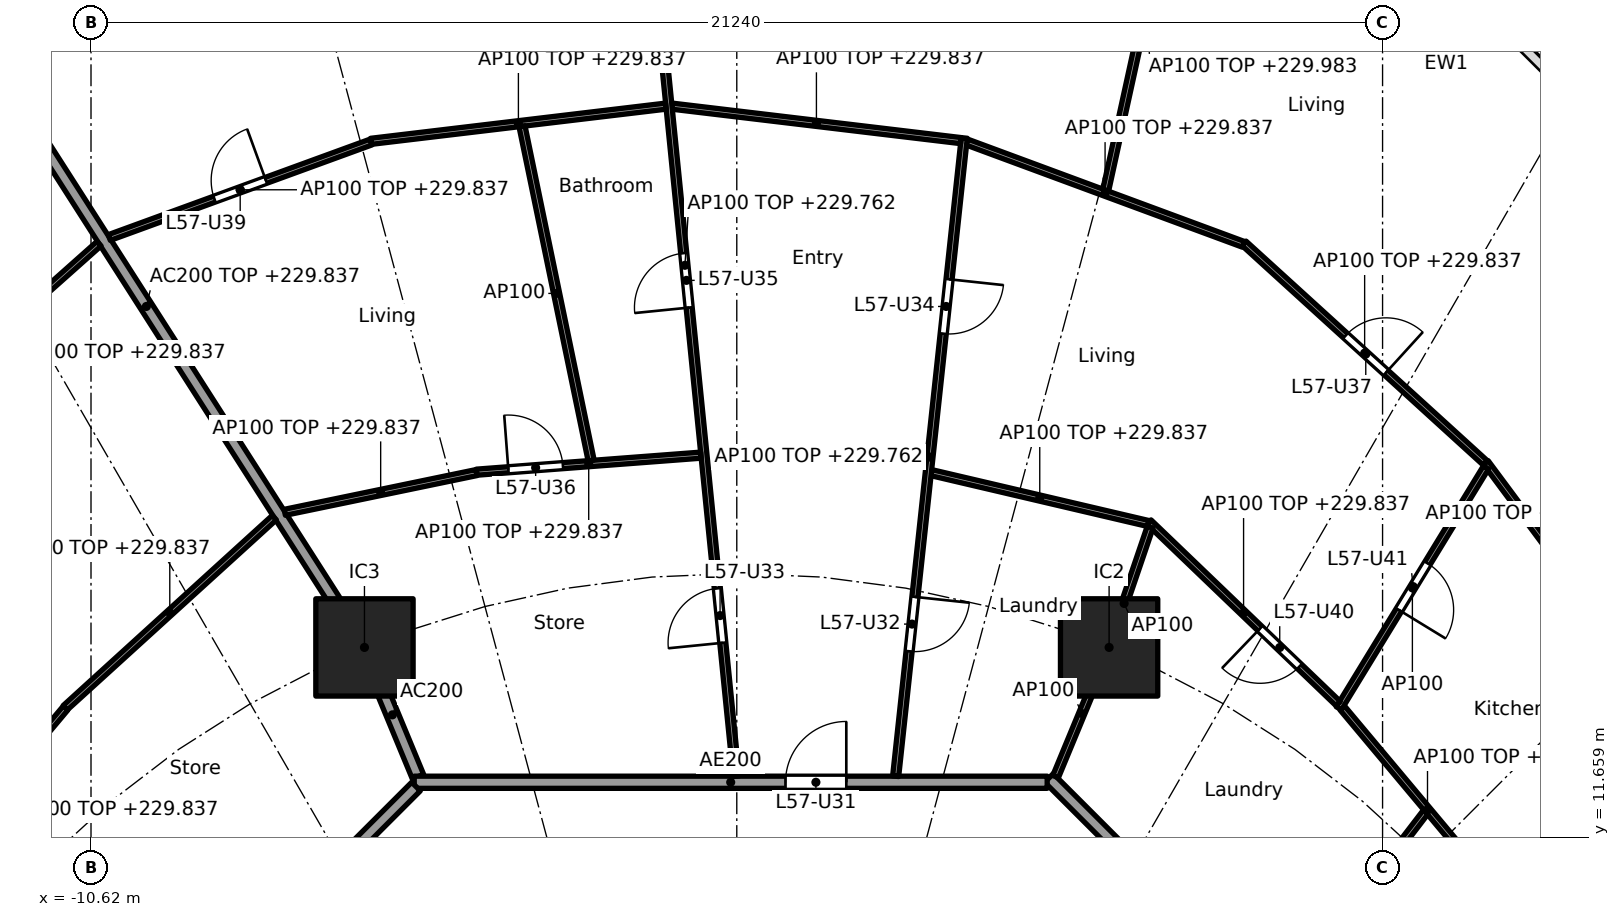
"""IFC4 building model, lengths in metres.
Left out: names, types, materials, properties, quantities, classifications, styles, units other than length and angle.
Written with IfcOpenShell. Run it as: python <this file> out.ifc"""

import sys

from ifc_helpers import new_model, si_unit, direction, frame, frame_2d, origin, origin_2d, place, context, subcontext, project, spatial, rectangle, extrude, element, fill, save


model = new_model("IFC4")
c1 = context("Model", 3, precision=1e-05, world=origin(), true_north=direction((0.0, 1.0)))
c2 = subcontext(c1, "Body", "Model", "MODEL_VIEW")
j1 = project(units=[si_unit("LENGTHUNIT", "METRE"), si_unit("PLANEANGLEUNIT", "RADIAN")], contexts=[c1])
p1 = place(None, origin())
s1 = spatial("IfcSite", under=j1, at=p1, CompositionType="ELEMENT")
p2 = place(p1, origin())
s2 = spatial("IfcBuilding", under=s1, at=p2, CompositionType="ELEMENT")
p3 = place(p2, frame((0.0, 0.0, 227.0)))
s3 = spatial("IfcBuildingStorey", under=s2, at=p3, CompositionType="ELEMENT", Elevation=227.0)
for number, where, z_axis, x_axis in (
    (1, (6.123, 14.782, 0.0), (0.0, 0.0, 1.0), (1.0, 0.0, 0.0)),
    (2, (-6.123, 14.782, 0.0), (0.0, 0.0, 1.0), (1.0, 0.0, 0.0)),
):
    element("IfcColumn", number, at=place(p3, frame(where, z_axis=z_axis, x_axis=x_axis)), inside=s3, PredefinedType="COLUMN", context=c2, shape_type="SweptSolid", body=[
        extrude(rectangle(XDim=1.6, YDim=1.6, at=origin_2d()), origin(), (0.0, 0.0, 1.0), 3.7),
    ])
p4 = place(p3, frame((-5.243, 12.657, 0.0), z_axis=(0.0, 0.0, 1.0), x_axis=(-0.382691608661, 0.923876145736, 0.0)))
e3 = element("IfcWall", 3, at=p4, inside=s3, PredefinedType="PARTITIONING", context=c2, shape_type="SweptSolid", body=[
    extrude(rectangle(XDim=2.2, YDim=0.2, at=frame_2d((1.1, 0.0))), origin(), (0.0, 0.0, 1.0), 3.44),
])
p5 = place(p3, frame((-6.15, 14.824, 0.0), z_axis=(0.0, 0.0, 1.0), x_axis=(-0.538870687577, 0.842388498301, 0.0)))
e4 = element("IfcWall", 4, at=p5, inside=s3, PredefinedType="PARTITIONING", context=c2, shape_type="SweptSolid", body=[
    extrude(rectangle(XDim=13.213, YDim=0.2, at=frame_2d((6.606, 0.0))), origin(), (0.0, 0.0, 1.0), 2.837),
])
p6 = place(p3, frame((12.635, 5.134, 0.0), z_axis=(0.0, 0.0, 1.0), x_axis=(-0.707106781187, 0.707106781187, 0.0)))
e5 = element("IfcWall", 5, at=p6, inside=s3, PredefinedType="PARTITIONING", context=c2, shape_type="SweptSolid", body=[
    extrude(rectangle(XDim=10.609, YDim=0.2, at=frame_2d((5.305, 0.0))), origin(), (0.0, 0.0, 1.0), 3.44),
])
p7 = place(p3, frame((5.104, 12.565, 0.0), z_axis=(0.0, 0.0, 1.0), x_axis=(-1.0, 0.0, 0.0)))
e6 = element("IfcWall", 6, at=p7, inside=s3, PredefinedType="PARTITIONING", context=c2, shape_type="SweptSolid", body=[
    extrude(rectangle(XDim=10.409, YDim=0.2, at=frame_2d((5.205, 0.0))), origin(), (0.0, 0.0, 1.0), 3.44),
])
p8 = place(p7, frame((3.303, 0.0, 0.0)))
e7 = element("IfcOpeningElement", 7, at=p8, cuts=e6, PredefinedType="OPENING", context=c2, shape_type="SweptSolid", body=[
    extrude(rectangle(XDim=1.0, YDim=2.1, at=frame_2d((0.5, 1.05))), frame((0.0, 0.11, 0.0), z_axis=(0.0, -1.0, 0.0), x_axis=(1.0, 0.0, 0.0)), (0.0, 0.0, 1.0), 0.22),
])
p9 = place(p3, frame((-5.275, 12.494, 0.0), z_axis=(0.0, 0.0, 1.0), x_axis=(-0.707106781187, -0.707106781187, 0.0)))
e8 = element("IfcWall", 8, at=p9, inside=s3, PredefinedType="PARTITIONING", context=c2, shape_type="SweptSolid", body=[
    extrude(rectangle(XDim=10.209, YDim=0.2, at=frame_2d((5.104, 0.0))), origin(), (0.0, 0.0, 1.0), 3.44),
])
p10 = place(p9, frame((6.339, 0.0, 0.0)))
e9 = element("IfcOpeningElement", 9, at=p10, cuts=e8, PredefinedType="OPENING", context=c2, shape_type="SweptSolid", body=[
    extrude(rectangle(XDim=1.0, YDim=2.1, at=frame_2d((0.5, 1.05))), frame((0.0, 0.11, 0.0), z_axis=(0.0, -1.0, 0.0), x_axis=(1.0, 0.0, 0.0)), (0.0, 0.0, 1.0), 0.22),
])
p11 = place(p3, frame((12.759, 10.443, 0.0), z_axis=(0.0, 0.0, 1.0), x_axis=(-0.642225196965, 0.766516011825, 0.0)))
e10 = element("IfcWall", 10, at=p11, inside=s3, PredefinedType="PARTITIONING", context=c2, shape_type="SweptSolid", body=[
    extrude(rectangle(XDim=4.361, YDim=0.1, at=frame_2d((2.18, 0.0))), origin(), (0.0, 0.0, 1.0), 2.837),
])
p12 = place(p3, frame((15.621, 13.374, 0.0), z_axis=(0.0, 0.0, 1.0), x_axis=(-0.596165830899, 0.802861321816, 0.0)))
e11 = element("IfcWall", 11, at=p12, inside=s3, PredefinedType="PARTITIONING", context=c2, shape_type="SweptSolid", body=[
    extrude(rectangle(XDim=5.542, YDim=0.1, at=frame_2d((2.771, 0.0))), origin(), (0.0, 0.0, 1.0), 2.837),
])
p13 = place(p3, frame((8.946, 8.964, 0.0), z_axis=(0.0, 0.0, 1.0), x_axis=(0.608213063121, 0.793773815296, 0.0)))
e12 = element("IfcWall", 12, at=p13, inside=s3, PredefinedType="PARTITIONING", context=c2, shape_type="SweptSolid", body=[
    extrude(rectangle(XDim=3.918, YDim=0.1, at=frame_2d((1.959, 0.0))), origin(), (0.0, 0.0, 1.0), 2.762),
])
p14 = place(p3, frame((9.9, 13.781, 0.0), z_axis=(0.0, 0.0, 1.0), x_axis=(0.521464905534, 0.853272730313, 0.0)))
e13 = element("IfcWall", 13, at=p14, inside=s3, PredefinedType="PARTITIONING", context=c2, shape_type="SweptSolid", body=[
    extrude(rectangle(XDim=4.641, YDim=0.1, at=frame_2d((2.32, 0.0))), origin(), (0.0, 0.0, 1.0), 3.44),
])
p15 = place(p14, frame((1.895, 0.0, 0.0)))
e14 = element("IfcOpeningElement", 14, at=p15, cuts=e13, PredefinedType="OPENING", context=c2, shape_type="SweptSolid", body=[
    extrude(rectangle(XDim=0.9, YDim=2.1, at=frame_2d((0.45, 1.05))), frame((0.0, 0.06, 0.0), z_axis=(0.0, -1.0, 0.0), x_axis=(1.0, 0.0, 0.0)), (0.0, 0.0, 1.0), 0.12),
])
p16 = place(p3, frame((9.89, 13.858, 0.0), z_axis=(0.0, 0.0, 1.0), x_axis=(-0.72167233993, 0.692234811159, 0.0)))
e15 = element("IfcWall", 15, at=p16, inside=s3, PredefinedType="PARTITIONING", context=c2, shape_type="SweptSolid", body=[
    extrude(rectangle(XDim=4.313, YDim=0.1, at=frame_2d((2.156, 0.0))), origin(), (0.0, 0.0, 1.0), 2.837),
])
p17 = place(p16, frame((0.883, 0.0, 0.0)))
e16 = element("IfcOpeningElement", 16, at=p17, cuts=e15, PredefinedType="OPENING", context=c2, shape_type="SweptSolid", body=[
    extrude(rectangle(XDim=0.9, YDim=2.1, at=frame_2d((0.45, 1.05))), frame((0.0, 0.06, 0.0), z_axis=(0.0, -1.0, 0.0), x_axis=(1.0, 0.0, 0.0)), (0.0, 0.0, 1.0), 0.12),
])
p18 = place(p3, frame((12.31, 17.817, 0.0), z_axis=(0.0, 0.0, 1.0), x_axis=(-0.739697052892, 0.672940019573, 0.0)))
e17 = element("IfcWall", 17, at=p18, inside=s3, PredefinedType="PARTITIONING", context=c2, shape_type="SweptSolid", body=[
    extrude(rectangle(XDim=5.365, YDim=0.1, at=frame_2d((2.683, 0.0))), origin(), (0.0, 0.0, 1.0), 2.837),
])
p19 = place(p18, frame((2.208, 0.0, 0.0)))
e18 = element("IfcOpeningElement", 18, at=p19, cuts=e17, PredefinedType="OPENING", context=c2, shape_type="SweptSolid", body=[
    extrude(rectangle(XDim=0.9, YDim=2.1, at=frame_2d((0.45, 1.05))), frame((0.0, 0.06, 0.0), z_axis=(0.0, -1.0, 0.0), x_axis=(1.0, 0.0, 0.0)), (0.0, 0.0, 1.0), 0.12),
])
p20 = place(p3, frame((5.243, 12.657, 0.0), z_axis=(0.0, 0.0, 1.0), x_axis=(0.382719158442, 0.923864733477, 0.0)))
e19 = element("IfcWall", 19, at=p20, inside=s3, PredefinedType="PARTITIONING", context=c2, shape_type="SweptSolid", body=[
    extrude(rectangle(XDim=2.25, YDim=0.1, at=frame_2d((1.125, 0.0))), origin(), (0.0, 0.0, 1.0), 3.44),
])
p21 = place(p3, frame((6.139, 14.829, 0.0), z_axis=(0.0, 0.0, 1.0), x_axis=(0.32278593828, 0.946471995385, 0.0)))
e20 = element("IfcWall", 20, at=p21, inside=s3, PredefinedType="PARTITIONING", context=c2, shape_type="SweptSolid", body=[
    extrude(rectangle(XDim=2.042, YDim=0.1, at=frame_2d((1.021, 0.0))), origin(), (0.0, 0.0, 1.0), 3.44),
])
p22 = place(p3, frame((6.766, 16.82, 0.0), z_axis=(0.0, 0.0, 1.0), x_axis=(-0.973612608559, 0.22820711745, 0.0)))
e21 = element("IfcWall", 21, at=p22, inside=s3, PredefinedType="PARTITIONING", context=c2, shape_type="SweptSolid", body=[
    extrude(rectangle(XDim=3.663, YDim=0.1, at=frame_2d((1.832, 0.0))), origin(), (0.0, 0.0, 1.0), 2.837),
])
p23 = place(p3, frame((8.331, 21.411, 0.0), z_axis=(0.0, 0.0, 1.0), x_axis=(-0.937891982431, 0.346927412136, 0.0)))
e22 = element("IfcWall", 22, at=p23, inside=s3, PredefinedType="PARTITIONING", context=c2, shape_type="SweptSolid", body=[
    extrude(rectangle(XDim=4.85, YDim=0.1, at=frame_2d((2.425, 0.0))), origin(), (0.0, 0.0, 1.0), 2.837),
])
p24 = place(p3, frame((6.067, 22.301, 0.0), z_axis=(0.0, 0.0, 1.0), x_axis=(0.214401821533, 0.976745544614, 0.0)))
e23 = element("IfcWall", 23, at=p24, inside=s3, PredefinedType="PARTITIONING", context=c2, shape_type="SweptSolid", body=[
    extrude(rectangle(XDim=6.228, YDim=0.1, at=frame_2d((3.114, 0.0))), origin(), (0.0, 0.0, 1.0), 2.983),
])
p25 = place(p24, frame((2.664, 0.0, 0.0)))
e24 = element("IfcOpeningElement", 24, at=p25, cuts=e23, PredefinedType="OPENING", context=c2, shape_type="SweptSolid", body=[
    extrude(rectangle(XDim=0.9, YDim=2.1, at=frame_2d((0.45, 1.05))), frame((0.0, 0.06, 0.0), z_axis=(0.0, -1.0, 0.0), x_axis=(1.0, 0.0, 0.0)), (0.0, 0.0, 1.0), 0.12),
])
p26 = place(p3, frame((2.613, 12.664, 0.0), z_axis=(0.0, 0.0, 1.0), x_axis=(0.106823825758, 0.994277964279, 0.0)))
e25 = element("IfcWall", 25, at=p26, inside=s3, PredefinedType="PARTITIONING", context=c2, shape_type="SweptSolid", body=[
    extrude(rectangle(XDim=10.556, YDim=0.1, at=frame_2d((5.278, 0.0))), origin(), (0.0, 0.0, 1.0), 2.762),
])
p27 = place(p26, frame((2.066, 0.0, 0.0)))
e26 = element("IfcOpeningElement", 26, at=p27, cuts=e25, PredefinedType="OPENING", context=c2, shape_type="SweptSolid", body=[
    extrude(rectangle(XDim=0.9, YDim=2.1, at=frame_2d((0.45, 1.05))), frame((0.0, 0.06, 0.0), z_axis=(0.0, -1.0, 0.0), x_axis=(1.0, 0.0, 0.0)), (0.0, 0.0, 1.0), 0.12),
])
p28 = place(p26, frame((7.32, 0.0, 0.0)))
e27 = element("IfcOpeningElement", 27, at=p28, cuts=e25, PredefinedType="OPENING", context=c2, shape_type="SweptSolid", body=[
    extrude(rectangle(XDim=0.9, YDim=2.1, at=frame_2d((0.45, 1.05))), frame((0.0, 0.06, 0.0), z_axis=(0.0, -1.0, 0.0), x_axis=(1.0, 0.0, 0.0)), (0.0, 0.0, 1.0), 0.12),
])
p29 = place(p3, frame((3.686, 23.117, 0.0), z_axis=(0.0, 0.0, 1.0), x_axis=(-0.992965872314, 0.11840091393, 0.0)))
e28 = element("IfcWall", 28, at=p29, inside=s3, PredefinedType="PARTITIONING", context=c2, shape_type="SweptSolid", body=[
    extrude(rectangle(XDim=4.786, YDim=0.1, at=frame_2d((2.393, 0.0))), origin(), (0.0, 0.0, 1.0), 2.837),
])
p30 = place(p3, frame((-0.01, 12.664, 0.0), z_axis=(0.0, 0.0, 1.0), x_axis=(-0.099808591851, 0.995006655753, 0.0)))
e29 = element("IfcWall", 29, at=p30, inside=s3, PredefinedType="PARTITIONING", context=c2, shape_type="SweptSolid", body=[
    extrude(rectangle(XDim=16.888, YDim=0.1, at=frame_2d((8.444, 0.0))), origin(), (0.0, 0.0, 1.0), 2.762),
])
p31 = place(p30, frame((2.205, 0.0, 0.0)))
e30 = element("IfcOpeningElement", 30, at=p31, cuts=e29, PredefinedType="OPENING", context=c2, shape_type="SweptSolid", body=[
    extrude(rectangle(XDim=0.9, YDim=2.1, at=frame_2d((0.45, 1.05))), frame((0.0, 0.06, 0.0), z_axis=(0.0, -1.0, 0.0), x_axis=(1.0, 0.0, 0.0)), (0.0, 0.0, 1.0), 0.12),
])
p32 = place(p30, frame((7.745, 0.0, 0.0)))
e31 = element("IfcOpeningElement", 31, at=p32, cuts=e29, PredefinedType="OPENING", context=c2, shape_type="SweptSolid", body=[
    extrude(rectangle(XDim=0.9, YDim=2.1, at=frame_2d((0.45, 1.05))), frame((0.0, 0.06, 0.0), z_axis=(0.0, -1.0, 0.0), x_axis=(1.0, 0.0, 0.0)), (0.0, 0.0, 1.0), 0.12),
])
p33 = place(p3, frame((-0.59, 17.944, 0.0), z_axis=(0.0, 0.0, 1.0), x_axis=(-0.997133495787, -0.075662352452, 0.0)))
e32 = element("IfcWall", 32, at=p33, inside=s3, PredefinedType="PARTITIONING", context=c2, shape_type="SweptSolid", body=[
    extrude(rectangle(XDim=3.701, YDim=0.1, at=frame_2d((1.851, 0.0))), origin(), (0.0, 0.0, 1.0), 2.837),
])
p34 = place(p33, frame((2.276, 0.0, 0.0)))
e33 = element("IfcOpeningElement", 33, at=p34, cuts=e32, PredefinedType="OPENING", context=c2, shape_type="SweptSolid", body=[
    extrude(rectangle(XDim=0.9, YDim=2.1, at=frame_2d((0.45, 1.05))), frame((0.0, 0.06, 0.0), z_axis=(0.0, -1.0, 0.0), x_axis=(1.0, 0.0, 0.0)), (0.0, 0.0, 1.0), 0.12),
])
p35 = place(p3, frame((-1.166, 23.683, 0.0), z_axis=(0.0, 0.0, 1.0), x_axis=(-0.992961712415, -0.118435795593, 0.0)))
e34 = element("IfcWall", 34, at=p35, inside=s3, PredefinedType="PARTITIONING", context=c2, shape_type="SweptSolid", body=[
    extrude(rectangle(XDim=4.885, YDim=0.1, at=frame_2d((2.443, 0.0))), origin(), (0.0, 0.0, 1.0), 2.837),
])
p36 = place(p3, frame((-2.395, 17.857, 0.0), z_axis=(0.0, 0.0, 1.0), x_axis=(-0.20251351451, 0.979279467997, 0.0)))
e35 = element("IfcWall", 35, at=p36, inside=s3, PredefinedType="PARTITIONING", context=c2, shape_type="SweptSolid", body=[
    extrude(rectangle(XDim=5.611, YDim=0.1, at=frame_2d((2.805, 0.0))), origin(), (0.0, 0.0, 1.0), 3.44),
])
p37 = place(p3, frame((-4.28, 17.657, 0.0), z_axis=(0.0, 0.0, 1.0), x_axis=(-0.979195545385, -0.202918909661, 0.0)))
e36 = element("IfcWall", 36, at=p37, inside=s3, PredefinedType="PARTITIONING", context=c2, shape_type="SweptSolid", body=[
    extrude(rectangle(XDim=3.221, YDim=0.1, at=frame_2d((1.61, 0.0))), origin(), (0.0, 0.0, 1.0), 2.837),
])
p38 = place(p3, frame((-6.014, 23.094, 0.0), z_axis=(0.0, 0.0, 1.0), x_axis=(-0.939433575811, -0.342731026665, 0.0)))
e37 = element("IfcWall", 37, at=p38, inside=s3, PredefinedType="PARTITIONING", context=c2, shape_type="SweptSolid", body=[
    extrude(rectangle(XDim=4.583, YDim=0.1, at=frame_2d((2.291, 0.0))), origin(), (0.0, 0.0, 1.0), 2.837),
])
p39 = place(p38, frame((1.841, 0.0, 0.0)))
e38 = element("IfcOpeningElement", 38, at=p39, cuts=e37, PredefinedType="OPENING", context=c2, shape_type="SweptSolid", body=[
    extrude(rectangle(XDim=0.9, YDim=2.1, at=frame_2d((0.45, 1.05))), frame((0.0, 0.06, 0.0), z_axis=(0.0, -1.0, 0.0), x_axis=(1.0, 0.0, 0.0)), (0.0, 0.0, 1.0), 0.12),
])
p40 = place(p3, frame((-7.605, 16.917, 0.0), z_axis=(0.0, 0.0, 1.0), x_axis=(-0.739828340504, -0.672795679673, 0.0)))
e39 = element("IfcWall", 39, at=p40, inside=s3, PredefinedType="PARTITIONING", context=c2, shape_type="SweptSolid", body=[
    extrude(rectangle(XDim=4.647, YDim=0.1, at=frame_2d((2.324, 0.0))), origin(), (0.0, 0.0, 1.0), 2.837),
])
p41 = place(p3, frame((-10.488, 21.422, 0.0), z_axis=(0.0, 0.0, 1.0), x_axis=(-0.747148551049, -0.664657086523, 0.0)))
e40 = element("IfcWall", 40, at=p41, inside=s3, PredefinedType="PARTITIONING", context=c2, shape_type="SweptSolid", body=[
    extrude(rectangle(XDim=5.425, YDim=0.1, at=frame_2d((2.712, 0.0))), origin(), (0.0, 0.0, 1.0), 2.837),
])
p42 = place(p41, frame((2.262, 0.0, 0.0)))
e41 = element("IfcOpeningElement", 41, at=p42, cuts=e40, PredefinedType="OPENING", context=c2, shape_type="SweptSolid", body=[
    extrude(rectangle(XDim=0.9, YDim=2.1, at=frame_2d((0.45, 1.05))), frame((0.0, 0.06, 0.0), z_axis=(0.0, -1.0, 0.0), x_axis=(1.0, 0.0, 0.0)), (0.0, 0.0, 1.0), 0.12),
])
p43 = place(p3, frame((-11.039, 13.785, 0.0), z_axis=(0.0, 0.0, 1.0), x_axis=(-0.642323585424, -0.766433566337, 0.0)))
e42 = element("IfcWall", 42, at=p43, inside=s3, PredefinedType="PARTITIONING", context=c2, shape_type="SweptSolid", body=[
    extrude(rectangle(XDim=2.13, YDim=0.1, at=frame_2d((1.065, 0.0))), origin(), (0.0, 0.0, 1.0), 2.837),
])
p44 = place(p3, frame((-8.959, 8.952, 0.0), z_axis=(0.0, 0.0, 1.0), x_axis=(-0.740140081805, 0.672452719011, 0.0)))
e43 = element("IfcWall", 43, at=p44, inside=s3, PredefinedType="PARTITIONING", context=c2, shape_type="SweptSolid", body=[
    extrude(rectangle(XDim=9.775, YDim=0.1, at=frame_2d((4.887, 0.0))), origin(), (0.0, 0.0, 1.0), 2.762),
])
p45 = place(p44, frame((1.901, 0.0, 0.0)))
e44 = element("IfcOpeningElement", 44, at=p45, cuts=e43, PredefinedType="OPENING", context=c2, shape_type="SweptSolid", body=[
    extrude(rectangle(XDim=0.9, YDim=2.1, at=frame_2d((0.45, 1.05))), frame((0.0, 0.06, 0.0), z_axis=(0.0, -1.0, 0.0), x_axis=(1.0, 0.0, 0.0)), (0.0, 0.0, 1.0), 0.12),
])
p46 = place(p44, frame((6.789, 0.0, 0.0)))
e45 = element("IfcOpeningElement", 45, at=p46, cuts=e43, PredefinedType="OPENING", context=c2, shape_type="SweptSolid", body=[
    extrude(rectangle(XDim=0.9, YDim=2.1, at=frame_2d((0.45, 1.05))), frame((0.0, 0.06, 0.0), z_axis=(0.0, -1.0, 0.0), x_axis=(1.0, 0.0, 0.0)), (0.0, 0.0, 1.0), 0.12),
])
p47 = place(p8, frame((1.0, 0.0, 0.0), x_axis=(-1.0, 0.0, 0.0)))
e46 = element("IfcDoor", 46, at=p47, inside=s3, OperationType="SINGLE_SWING_RIGHT", PredefinedType="DOOR", context=c2, shape_type="SweptSolid", body=[
    extrude(rectangle(XDim=1.0, YDim=2.1, at=frame_2d((0.5, 1.05))), frame((0.0, 0.025, 0.0), z_axis=(0.0, -1.0, 0.0), x_axis=(1.0, 0.0, 0.0)), (0.0, 0.0, 1.0), 0.05),
])
fill(e7, e46)
p48 = place(p27, frame((0.9, 0.0, 0.0), x_axis=(-1.0, 0.0, 0.0)))
e47 = element("IfcDoor", 47, at=p48, inside=s3, OperationType="SINGLE_SWING_LEFT", PredefinedType="DOOR", context=c2, shape_type="SweptSolid", body=[
    extrude(rectangle(XDim=0.9, YDim=2.1, at=frame_2d((0.45, 1.05))), frame((0.0, 0.025, 0.0), z_axis=(0.0, -1.0, 0.0), x_axis=(1.0, 0.0, 0.0)), (0.0, 0.0, 1.0), 0.05),
])
fill(e26, e47)
p49 = place(p31, origin())
e48 = element("IfcDoor", 48, at=p49, inside=s3, OperationType="SINGLE_SWING_LEFT", PredefinedType="DOOR", context=c2, shape_type="SweptSolid", body=[
    extrude(rectangle(XDim=0.9, YDim=2.1, at=frame_2d((0.45, 1.05))), frame((0.0, 0.025, 0.0), z_axis=(0.0, -1.0, 0.0), x_axis=(1.0, 0.0, 0.0)), (0.0, 0.0, 1.0), 0.05),
])
fill(e30, e48)
p50 = place(p28, frame((0.9, 0.0, 0.0), x_axis=(-1.0, 0.0, 0.0)))
e49 = element("IfcDoor", 49, at=p50, inside=s3, OperationType="SINGLE_SWING_LEFT", PredefinedType="DOOR", context=c2, shape_type="SweptSolid", body=[
    extrude(rectangle(XDim=0.9, YDim=2.1, at=frame_2d((0.45, 1.05))), frame((0.0, 0.025, 0.0), z_axis=(0.0, -1.0, 0.0), x_axis=(1.0, 0.0, 0.0)), (0.0, 0.0, 1.0), 0.05),
])
fill(e27, e49)
p51 = place(p32, origin())
e50 = element("IfcDoor", 50, at=p51, inside=s3, OperationType="SINGLE_SWING_LEFT", PredefinedType="DOOR", context=c2, shape_type="SweptSolid", body=[
    extrude(rectangle(XDim=0.9, YDim=2.1, at=frame_2d((0.45, 1.05))), frame((0.0, 0.025, 0.0), z_axis=(0.0, -1.0, 0.0), x_axis=(1.0, 0.0, 0.0)), (0.0, 0.0, 1.0), 0.05),
])
fill(e31, e50)
p52 = place(p34, frame((0.9, 0.0, 0.0), x_axis=(-1.0, 0.0, 0.0)))
e51 = element("IfcDoor", 51, at=p52, inside=s3, OperationType="SINGLE_SWING_LEFT", PredefinedType="DOOR", context=c2, shape_type="SweptSolid", body=[
    extrude(rectangle(XDim=0.9, YDim=2.1, at=frame_2d((0.45, 1.05))), frame((0.0, 0.025, 0.0), z_axis=(0.0, -1.0, 0.0), x_axis=(1.0, 0.0, 0.0)), (0.0, 0.0, 1.0), 0.05),
])
fill(e33, e51)
p53 = place(p19, frame((0.9, 0.0, 0.0), x_axis=(-1.0, 0.0, 0.0)))
e52 = element("IfcDoor", 52, at=p53, inside=s3, OperationType="SINGLE_SWING_RIGHT", PredefinedType="DOOR", context=c2, shape_type="SweptSolid", body=[
    extrude(rectangle(XDim=0.9, YDim=2.1, at=frame_2d((0.45, 1.05))), frame((0.0, 0.025, 0.0), z_axis=(0.0, -1.0, 0.0), x_axis=(1.0, 0.0, 0.0)), (0.0, 0.0, 1.0), 0.05),
])
fill(e18, e52)
p54 = place(p39, frame((0.9, 0.0, 0.0), x_axis=(-1.0, 0.0, 0.0)))
e53 = element("IfcDoor", 53, at=p54, inside=s3, OperationType="SINGLE_SWING_RIGHT", PredefinedType="DOOR", context=c2, shape_type="SweptSolid", body=[
    extrude(rectangle(XDim=0.9, YDim=2.1, at=frame_2d((0.45, 1.05))), frame((0.0, 0.025, 0.0), z_axis=(0.0, -1.0, 0.0), x_axis=(1.0, 0.0, 0.0)), (0.0, 0.0, 1.0), 0.05),
])
fill(e38, e53)
p55 = place(p17, origin())
e54 = element("IfcDoor", 54, at=p55, inside=s3, OperationType="SINGLE_SWING_RIGHT", PredefinedType="DOOR", context=c2, shape_type="SweptSolid", body=[
    extrude(rectangle(XDim=0.9, YDim=2.1, at=frame_2d((0.45, 1.05))), frame((0.0, 0.025, 0.0), z_axis=(0.0, -1.0, 0.0), x_axis=(1.0, 0.0, 0.0)), (0.0, 0.0, 1.0), 0.05),
])
fill(e16, e54)
p56 = place(p15, frame((0.9, 0.0, 0.0), x_axis=(-1.0, 0.0, 0.0)))
e55 = element("IfcDoor", 55, at=p56, inside=s3, OperationType="SINGLE_SWING_RIGHT", PredefinedType="DOOR", context=c2, shape_type="SweptSolid", body=[
    extrude(rectangle(XDim=0.9, YDim=2.1, at=frame_2d((0.45, 1.05))), frame((0.0, 0.025, 0.0), z_axis=(0.0, -1.0, 0.0), x_axis=(1.0, 0.0, 0.0)), (0.0, 0.0, 1.0), 0.05),
])
fill(e14, e55)
save(model, sys.argv[1])
